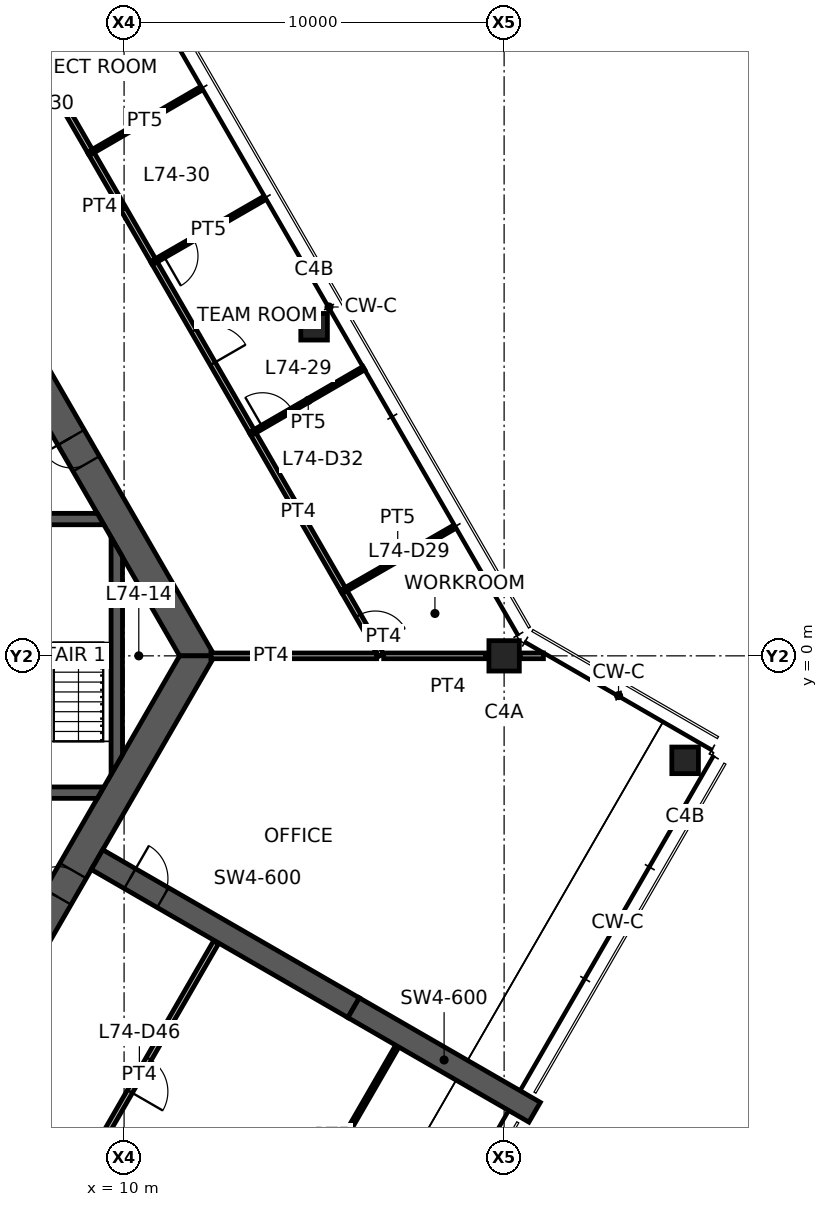
"""IFC4 building model, lengths in metres.
Left out: names, types, materials, properties, quantities, classifications, styles, units other than length and angle.
Written with IfcOpenShell. Run it as: python <this file> out.ifc"""

import sys

from ifc_helpers import new_model, si_unit, direction, frame, frame_2d, origin, origin_2d, place, context, subcontext, project, spatial, polyline, rectangle, hollow_rectangle, outline, extrude, element, fill, save


model = new_model("IFC4")
c1 = context("Model", 3, precision=1e-05, world=origin(), true_north=direction((0.0, 1.0)))
c2 = subcontext(c1, "Body", "Model", "MODEL_VIEW")
j1 = project(units=[si_unit("LENGTHUNIT", "METRE"), si_unit("PLANEANGLEUNIT", "RADIAN")], contexts=[c1])
p1 = place(None, origin())
s1 = spatial("IfcSite", under=j1, at=p1, CompositionType="ELEMENT")
p2 = place(p1, origin())
s2 = spatial("IfcBuilding", under=s1, at=p2, CompositionType="ELEMENT")
p3 = place(p2, frame((0.0, 0.0, 294.7)))
s3 = spatial("IfcBuildingStorey", under=s2, at=p3, CompositionType="ELEMENT", Elevation=294.7)
p4 = place(p3, frame((20.0, 0.0, 0.0), z_axis=(0.0, 0.0, 1.0), x_axis=(1.0, 0.0, 0.0)))
e1 = element("IfcColumn", 1, at=p4, inside=s3, PredefinedType="COLUMN", context=c2, shape_type="SweptSolid", body=[
    extrude(hollow_rectangle(XDim=0.8, YDim=0.8, WallThickness=0.04, at=origin_2d()), origin(), (0.0, 0.0, 1.0), 3.9),
])
for number, where, z_axis, x_axis in (
    (2, (15.0, 8.66, 0.0), (0.0, 0.0, 1.0), (1.0, 0.0, 0.0)),
    (3, (24.763, -2.75, 0.0), (0.0, 0.0, 1.0), (1.0, 0.0, 0.0)),
):
    element("IfcColumn", number, at=place(p3, frame(where, z_axis=z_axis, x_axis=x_axis)), inside=s3, PredefinedType="COLUMN", context=c2, shape_type="SweptSolid", body=[
        extrude(hollow_rectangle(XDim=0.7, YDim=0.7, WallThickness=0.032, at=origin_2d()), origin(), (0.0, 0.0, 1.0), 3.9),
    ])
p5 = place(p3, frame((11.922, 0.0, 0.0), z_axis=(0.0, 0.0, 1.0), x_axis=(-0.500004296715, 0.866022923061, 0.0)))
e4 = element("IfcWall", 4, at=p5, inside=s3, PredefinedType="SHEAR", context=c2, shape_type="SweptSolid", body=[
    extrude(outline(polyline([(-0.231, -0.4), (5.835, -0.4), (6.635, -0.4), (12.153, -0.4), (11.691, 0.4), (6.635, 0.4), (5.835, 0.4), (0.231, 0.4), (-0.231, -0.4)])), origin(), (0.0, 0.0, 1.0), 3.9),
])
p6 = place(p5, frame((5.835, 0.0, 0.0)))
e5 = element("IfcOpeningElement", 5, at=p6, cuts=e4, PredefinedType="OPENING", context=c2, shape_type="SweptSolid", body=[
    extrude(rectangle(XDim=0.8, YDim=2.1, at=frame_2d((0.4, 1.05))), frame((0.0, 0.41, 0.0), z_axis=(0.0, -1.0, 0.0), x_axis=(1.0, 0.0, 0.0)), (0.0, 0.0, 1.0), 0.82),
])
p7 = place(p3, frame((5.961, -10.325, 0.0), z_axis=(0.0, 0.0, 1.0), x_axis=(0.500004296715, 0.866022923061, 0.0)))
e6 = element("IfcWall", 6, at=p7, inside=s3, PredefinedType="SHEAR", context=c2, shape_type="SweptSolid", body=[
    extrude(outline(polyline([(-0.231, -0.4), (4.594, -0.4), (5.394, -0.4), (12.153, -0.4), (11.691, 0.4), (5.394, 0.4), (4.594, 0.4), (0.231, 0.4), (-0.231, -0.4)])), origin(), (0.0, 0.0, 1.0), 3.9),
])
p8 = place(p7, frame((4.594, 0.0, 0.0)))
e7 = element("IfcOpeningElement", 7, at=p8, cuts=e6, PredefinedType="OPENING", context=c2, shape_type="SweptSolid", body=[
    extrude(rectangle(XDim=0.8, YDim=2.1, at=frame_2d((0.4, 1.05))), frame((0.0, 0.41, 0.0), z_axis=(0.0, -1.0, 0.0), x_axis=(1.0, 0.0, 0.0)), (0.0, 0.0, 1.0), 0.82),
])
p9 = place(p3, frame((9.288, -5.363, 0.0), z_axis=(0.0, 0.0, 1.0), x_axis=(0.866031736626, -0.499989031036, 0.0)))
e8 = element("IfcWall", 8, at=p9, inside=s3, PredefinedType="SHEAR", context=c2, shape_type="SweptSolid", body=[
    extrude(rectangle(XDim=7.796, YDim=0.6, at=frame_2d((3.898, 0.0))), origin(), (0.0, 0.0, 1.0), 3.9),
])
p10 = place(p9, frame((1.0, 0.0, 0.0)))
e9 = element("IfcOpeningElement", 9, at=p10, cuts=e8, PredefinedType="OPENING", context=c2, shape_type="SweptSolid", body=[
    extrude(rectangle(XDim=1.0, YDim=2.1, at=frame_2d((0.5, 1.05))), frame((0.0, 0.31, 0.0), z_axis=(0.0, -1.0, 0.0), x_axis=(1.0, 0.0, 0.0)), (0.0, 0.0, 1.0), 0.62),
])
p11 = place(p3, frame((16.039, -9.26, 0.0), z_axis=(0.0, 0.0, 1.0), x_axis=(0.866027397988, -0.499996545922, 0.0)))
e10 = element("IfcWall", 10, at=p11, inside=s3, PredefinedType="SHEAR", context=c2, shape_type="SweptSolid", body=[
    extrude(rectangle(XDim=5.5, YDim=0.6, at=frame_2d((2.75, 0.0))), origin(), (0.0, 0.0, 1.0), 3.9),
])
p12 = place(p3, frame((1.45, 3.6, 0.0), z_axis=(0.0, 0.0, 1.0), x_axis=(1.0, 0.0, 0.0)))
e11 = element("IfcWall", 11, at=p12, inside=s3, PredefinedType="SHEAR", context=c2, shape_type="SweptSolid", body=[
    extrude(outline(polyline([(0.0, -0.15), (1.15, -0.15), (2.05, -0.15), (3.4, -0.15), (4.7, -0.15), (8.019, -0.15), (7.845, 0.15), (4.7, 0.15), (3.4, 0.15), (2.05, 0.15), (1.15, 0.15), (0.0, 0.15), (0.0, -0.15)])), origin(), (0.0, 0.0, 1.0), 3.9),
])
p13 = place(p12, frame((1.15, 0.0, 0.0)))
e12 = element("IfcOpeningElement", 12, at=p13, cuts=e11, PredefinedType="OPENING", context=c2, shape_type="SweptSolid", body=[
    extrude(rectangle(XDim=0.9, YDim=2.1, at=frame_2d((0.45, 1.05))), frame((0.0, 0.16, 0.0), z_axis=(0.0, -1.0, 0.0), x_axis=(1.0, 0.0, 0.0)), (0.0, 0.0, 1.0), 0.32),
])
p14 = place(p12, frame((3.4, 0.0, 0.0)))
e13 = element("IfcOpeningElement", 13, at=p14, cuts=e11, PredefinedType="OPENING", context=c2, shape_type="SweptSolid", body=[
    extrude(rectangle(XDim=1.3, YDim=2.1, at=frame_2d((0.65, 1.05))), frame((0.0, 0.16, 0.0), z_axis=(0.0, -1.0, 0.0), x_axis=(1.0, 0.0, 0.0)), (0.0, 0.0, 1.0), 0.32),
])
p15 = place(p3, frame((1.45, -3.6, 0.0), z_axis=(0.0, 0.0, 1.0), x_axis=(1.0, 0.0, 0.0)))
e14 = element("IfcWall", 14, at=p15, inside=s3, PredefinedType="SHEAR", context=c2, shape_type="SweptSolid", body=[
    extrude(outline(polyline([(0.0, -0.15), (1.05, -0.15), (2.15, -0.15), (7.845, -0.15), (8.019, 0.15), (2.15, 0.15), (1.05, 0.15), (0.0, 0.15), (0.0, -0.15)])), origin(), (0.0, 0.0, 1.0), 3.9),
])
p16 = place(p15, frame((1.05, 0.0, 0.0)))
e15 = element("IfcOpeningElement", 15, at=p16, cuts=e14, PredefinedType="OPENING", context=c2, shape_type="SweptSolid", body=[
    extrude(rectangle(XDim=1.1, YDim=2.1, at=frame_2d((0.55, 1.05))), frame((0.0, 0.16, 0.0), z_axis=(0.0, -1.0, 0.0), x_axis=(1.0, 0.0, 0.0)), (0.0, 0.0, 1.0), 0.32),
])
p17 = place(p3, frame((9.808, -2.862, 0.0), z_axis=(0.0, 0.0, 1.0), x_axis=(0.0, 1.0, 0.0)))
e16 = element("IfcWall", 16, at=p17, inside=s3, PredefinedType="SHEAR", context=c2, shape_type="SweptSolid", body=[
    extrude(outline(polyline([(0.26, -0.15), (5.465, -0.15), (5.984, 0.15), (-0.26, 0.15), (0.26, -0.15)])), origin(), (0.0, 0.0, 1.0), 3.9),
])
p18 = place(p3, frame((13.376, 5.882, 0.0), z_axis=(0.0, 0.0, 1.0), x_axis=(0.499991431567, -0.866030350715, 0.0)))
e17 = element("IfcWall", 17, at=p18, inside=s3, PredefinedType="PARTITIONING", context=c2, shape_type="SweptSolid", body=[
    extrude(rectangle(XDim=4.819, YDim=0.15, at=frame_2d((2.409, 0.0))), origin(), (0.0, 0.0, 1.0), 2.95),
])
p19 = place(p3, frame((9.119, 13.256, 0.0), z_axis=(0.0, 0.0, 1.0), x_axis=(0.499990242038, -0.866031037473, 0.0)))
e18 = element("IfcWall", 18, at=p19, inside=s3, PredefinedType="PARTITIONING", context=c2, shape_type="SweptSolid", body=[
    extrude(rectangle(XDim=3.341, YDim=0.15, at=frame_2d((1.67, 0.0))), origin(), (0.0, 0.0, 1.0), 2.95),
])
p20 = place(p3, frame((15.781, 1.717, 0.0), z_axis=(0.0, 0.0, 1.0), x_axis=(0.499984888139, -0.866034128446, 0.0)))
e19 = element("IfcWall", 19, at=p20, inside=s3, PredefinedType="PARTITIONING", context=c2, shape_type="SweptSolid", body=[
    extrude(rectangle(XDim=1.959, YDim=0.15, at=frame_2d((0.98, 0.0))), origin(), (0.0, 0.0, 1.0), 2.95),
])
p21 = place(p20, frame((0.76, 0.0, 0.0)))
e20 = element("IfcOpeningElement", 20, at=p21, cuts=e19, PredefinedType="OPENING", context=c2, shape_type="SweptSolid", body=[
    extrude(rectangle(XDim=0.9, YDim=2.1, at=frame_2d((0.45, 1.05))), frame((0.0, 0.085, 0.0), z_axis=(0.0, -1.0, 0.0), x_axis=(1.0, 0.0, 0.0)), (0.0, 0.0, 1.0), 0.17),
])
p22 = place(p3, frame((6.826, 14.525, 0.0), z_axis=(0.0, 0.0, 1.0), x_axis=(1.0, 0.0, 0.0)))
e21 = element("IfcWall", 21, at=p22, inside=s3, PredefinedType="PARTITIONING", context=c2, shape_type="SweptSolid", body=[
    extrude(rectangle(XDim=1.56, YDim=0.15, at=frame_2d((0.78, 0.0))), origin(), (0.0, 0.0, 1.0), 2.95),
])
p23 = place(p22, frame((0.33, 0.0, 0.0)))
e22 = element("IfcOpeningElement", 22, at=p23, cuts=e21, PredefinedType="OPENING", context=c2, shape_type="SweptSolid", body=[
    extrude(rectangle(XDim=0.9, YDim=2.1, at=frame_2d((0.45, 1.05))), frame((0.0, 0.085, 0.0), z_axis=(0.0, -1.0, 0.0), x_axis=(1.0, 0.0, 0.0)), (0.0, 0.0, 1.0), 0.17),
])
p24 = place(p3, frame((8.386, 14.525, 0.0), z_axis=(0.0, 0.0, 1.0), x_axis=(0.500090108003, -0.865973373654, 0.0)))
e23 = element("IfcWall", 23, at=p24, inside=s3, PredefinedType="PARTITIONING", context=c2, shape_type="SweptSolid", body=[
    extrude(rectangle(XDim=1.475, YDim=0.15, at=frame_2d((0.738, 0.0))), origin(), (0.0, 0.0, 1.0), 2.95),
])
p25 = place(p3, frame((10.785, 10.37, 0.0), z_axis=(0.0, 0.0, 1.0), x_axis=(0.499992432099, -0.86602977307, 0.0)))
e24 = element("IfcWall", 24, at=p25, inside=s3, PredefinedType="PARTITIONING", context=c2, shape_type="SweptSolid", body=[
    extrude(rectangle(XDim=5.192, YDim=0.15, at=frame_2d((2.596, 0.0))), origin(), (0.0, 0.0, 1.0), 2.95),
])
p26 = place(p25, frame((2.096, 0.0, 0.0)))
e25 = element("IfcOpeningElement", 25, at=p26, cuts=e24, PredefinedType="OPENING", context=c2, shape_type="SweptSolid", body=[
    extrude(rectangle(XDim=1.0, YDim=2.1, at=frame_2d((0.5, 1.05))), frame((0.0, 0.085, 0.0), z_axis=(0.0, -1.0, 0.0), x_axis=(1.0, 0.0, 0.0)), (0.0, 0.0, 1.0), 0.17),
])
p27 = place(p3, frame((18.62, 3.351, 0.0), z_axis=(0.0, 0.0, 1.0), x_axis=(-0.866762109236, -0.498721812229, 0.0)))
e26 = element("IfcWall", 26, at=p27, inside=s3, PredefinedType="PARTITIONING", context=c2, shape_type="SweptSolid", body=[
    extrude(rectangle(XDim=3.275, YDim=0.1, at=frame_2d((1.637, 0.0))), origin(), (0.0, 0.0, 1.0), 2.95),
])
p28 = place(p3, frame((13.381, 5.874, 0.0), z_axis=(0.0, 0.0, 1.0), x_axis=(0.865294595383, 0.501263666348, 0.0)))
e27 = element("IfcWall", 27, at=p28, inside=s3, PredefinedType="PARTITIONING", context=c2, shape_type="SweptSolid", body=[
    extrude(rectangle(XDim=3.385, YDim=0.1, at=frame_2d((1.693, 0.0))), origin(), (0.0, 0.0, 1.0), 2.95),
])
p29 = place(p28, frame((0.3, 0.0, 0.0)))
e28 = element("IfcOpeningElement", 28, at=p29, cuts=e27, PredefinedType="OPENING", context=c2, shape_type="SweptSolid", body=[
    extrude(rectangle(XDim=0.9, YDim=2.1, at=frame_2d((0.45, 1.05))), frame((0.0, 0.06, 0.0), z_axis=(0.0, -1.0, 0.0), x_axis=(1.0, 0.0, 0.0)), (0.0, 0.0, 1.0), 0.12),
])
p30 = place(p3, frame((9.124, 13.247, 0.0), z_axis=(0.0, 0.0, 1.0), x_axis=(0.865292288087, 0.501267649243, 0.0)))
e29 = element("IfcWall", 29, at=p30, inside=s3, PredefinedType="PARTITIONING", context=c2, shape_type="SweptSolid", body=[
    extrude(rectangle(XDim=3.286, YDim=0.1, at=frame_2d((1.643, 0.0))), origin(), (0.0, 0.0, 1.0), 2.95),
])
p31 = place(p3, frame((13.654, 12.022, 0.0), z_axis=(0.0, 0.0, 1.0), x_axis=(-0.866613759554, -0.498979550434, 0.0)))
e30 = element("IfcWall", 30, at=p31, inside=s3, PredefinedType="PARTITIONING", context=c2, shape_type="SweptSolid", body=[
    extrude(rectangle(XDim=3.311, YDim=0.1, at=frame_2d((1.655, 0.0))), origin(), (0.0, 0.0, 1.0), 2.95),
])
p32 = place(p31, frame((2.11, 0.0, 0.0)))
e31 = element("IfcOpeningElement", 31, at=p32, cuts=e30, PredefinedType="OPENING", context=c2, shape_type="SweptSolid", body=[
    extrude(rectangle(XDim=0.9, YDim=2.1, at=frame_2d((0.45, 1.05))), frame((0.0, 0.06, 0.0), z_axis=(0.0, -1.0, 0.0), x_axis=(1.0, 0.0, 0.0)), (0.0, 0.0, 1.0), 0.12),
])
p33 = place(p3, frame((12.419, -7.54, 0.0), z_axis=(0.0, 0.0, 1.0), x_axis=(-0.499996687877, -0.866027316031, 0.0)))
e32 = element("IfcWall", 32, at=p33, inside=s3, PredefinedType="PARTITIONING", context=c2, shape_type="SweptSolid", body=[
    extrude(rectangle(XDim=8.066, YDim=0.15, at=frame_2d((4.033, 0.0))), origin(), (0.0, 0.0, 1.0), 2.95),
])
p34 = place(p33, frame((3.533, 0.0, 0.0)))
e33 = element("IfcOpeningElement", 33, at=p34, cuts=e32, PredefinedType="OPENING", context=c2, shape_type="SweptSolid", body=[
    extrude(rectangle(XDim=1.0, YDim=2.1, at=frame_2d((0.5, 1.05))), frame((0.0, 0.085, 0.0), z_axis=(0.0, -1.0, 0.0), x_axis=(1.0, 0.0, 0.0)), (0.0, 0.0, 1.0), 0.17),
])
p35 = place(p3, frame((13.788, -16.159, 0.0), z_axis=(0.0, 0.0, 1.0), x_axis=(0.499992600721, 0.866029675718, 0.0)))
e34 = element("IfcWall", 34, at=p35, inside=s3, PredefinedType="PARTITIONING", context=c2, shape_type="SweptSolid", body=[
    extrude(rectangle(XDim=6.78, YDim=0.1, at=frame_2d((3.39, 0.0))), origin(), (0.0, 0.0, 1.0), 2.95),
])
p36 = place(p35, frame((0.3, 0.0, 0.0)))
e35 = element("IfcOpeningElement", 35, at=p36, cuts=e34, PredefinedType="OPENING", context=c2, shape_type="SweptSolid", body=[
    extrude(rectangle(XDim=0.9, YDim=2.1, at=frame_2d((0.45, 1.05))), frame((0.0, 0.06, 0.0), z_axis=(0.0, -1.0, 0.0), x_axis=(1.0, 0.0, 0.0)), (0.0, 0.0, 1.0), 0.12),
])
p37 = place(p3, frame((19.519, 0.0, 0.0), z_axis=(0.0, 0.0, 1.0), x_axis=(-1.0, 0.0, 0.0)))
e36 = element("IfcWall", 36, at=p37, inside=s3, PredefinedType="PARTITIONING", context=c2, shape_type="SweptSolid", body=[
    extrude(rectangle(XDim=2.688, YDim=0.15, at=frame_2d((1.344, 0.0))), origin(), (0.0, 0.0, 1.0), 2.95),
])
p38 = place(p3, frame((12.284, 0.0, 0.0), z_axis=(0.0, 0.0, 1.0), x_axis=(1.0, 0.0, 0.0)))
e37 = element("IfcWall", 37, at=p38, inside=s3, PredefinedType="PARTITIONING", context=c2, shape_type="SweptSolid", body=[
    extrude(rectangle(XDim=4.363, YDim=0.15, at=frame_2d((2.181, 0.0))), origin(), (0.0, 0.0, 1.0), 2.95),
])
p39 = place(p3, frame((20.42, 0.0, 0.0), z_axis=(0.0, 0.0, 1.0), x_axis=(1.0, 0.0, 0.0)))
e38 = element("IfcWall", 38, at=p39, inside=s3, PredefinedType="PARTITIONING", context=c2, shape_type="SweptSolid", body=[
    extrude(rectangle(XDim=0.614, YDim=0.15, at=frame_2d((0.307, 0.0))), origin(), (0.0, 0.0, 1.0), 2.95),
])
p40 = place(p6, origin())
e39 = element("IfcDoor", 39, at=p40, inside=s3, OperationType="SINGLE_SWING_RIGHT", PredefinedType="DOOR", context=c2, shape_type="SweptSolid", body=[
    extrude(rectangle(XDim=0.8, YDim=2.1, at=frame_2d((0.4, 1.05))), frame((0.0, 0.025, 0.0), z_axis=(0.0, -1.0, 0.0), x_axis=(1.0, 0.0, 0.0)), (0.0, 0.0, 1.0), 0.05),
])
fill(e5, e39)
p41 = place(p8, origin())
e40 = element("IfcDoor", 40, at=p41, inside=s3, OperationType="SINGLE_SWING_LEFT", PredefinedType="DOOR", context=c2, shape_type="SweptSolid", body=[
    extrude(rectangle(XDim=0.8, YDim=2.1, at=frame_2d((0.4, 1.05))), frame((0.0, 0.025, 0.0), z_axis=(0.0, -1.0, 0.0), x_axis=(1.0, 0.0, 0.0)), (0.0, 0.0, 1.0), 0.05),
])
fill(e7, e40)
p42 = place(p10, origin())
e41 = element("IfcDoor", 41, at=p42, inside=s3, OperationType="SINGLE_SWING_LEFT", PredefinedType="DOOR", context=c2, shape_type="SweptSolid", body=[
    extrude(rectangle(XDim=1.0, YDim=2.1, at=frame_2d((0.5, 1.05))), frame((0.0, 0.025, 0.0), z_axis=(0.0, -1.0, 0.0), x_axis=(1.0, 0.0, 0.0)), (0.0, 0.0, 1.0), 0.05),
])
fill(e9, e41)
p43 = place(p21, origin())
e42 = element("IfcDoor", 42, at=p43, inside=s3, OperationType="SINGLE_SWING_RIGHT", PredefinedType="DOOR", context=c2, shape_type="SweptSolid", body=[
    extrude(rectangle(XDim=0.9, YDim=2.1, at=frame_2d((0.45, 1.05))), frame((0.0, 0.025, 0.0), z_axis=(0.0, -1.0, 0.0), x_axis=(1.0, 0.0, 0.0)), (0.0, 0.0, 1.0), 0.05),
])
fill(e20, e42)
p44 = place(p26, origin())
e43 = element("IfcDoor", 43, at=p44, inside=s3, OperationType="SINGLE_SWING_RIGHT", PredefinedType="DOOR", context=c2, shape_type="SweptSolid", body=[
    extrude(rectangle(XDim=1.0, YDim=2.1, at=frame_2d((0.5, 1.05))), frame((0.0, 0.025, 0.0), z_axis=(0.0, -1.0, 0.0), x_axis=(1.0, 0.0, 0.0)), (0.0, 0.0, 1.0), 0.05),
])
fill(e25, e43)
p45 = place(p29, origin())
e44 = element("IfcDoor", 44, at=p45, inside=s3, OperationType="SINGLE_SWING_LEFT", PredefinedType="DOOR", context=c2, shape_type="SweptSolid", body=[
    extrude(rectangle(XDim=0.9, YDim=2.1, at=frame_2d((0.45, 1.05))), frame((0.0, 0.025, 0.0), z_axis=(0.0, -1.0, 0.0), x_axis=(1.0, 0.0, 0.0)), (0.0, 0.0, 1.0), 0.05),
])
fill(e28, e44)
p46 = place(p32, origin())
e45 = element("IfcDoor", 45, at=p46, inside=s3, OperationType="SINGLE_SWING_RIGHT", PredefinedType="DOOR", context=c2, shape_type="SweptSolid", body=[
    extrude(rectangle(XDim=0.9, YDim=2.1, at=frame_2d((0.45, 1.05))), frame((0.0, 0.025, 0.0), z_axis=(0.0, -1.0, 0.0), x_axis=(1.0, 0.0, 0.0)), (0.0, 0.0, 1.0), 0.05),
])
fill(e31, e45)
p47 = place(p34, origin())
e46 = element("IfcDoor", 46, at=p47, inside=s3, OperationType="SINGLE_SWING_RIGHT", PredefinedType="DOOR", context=c2, shape_type="SweptSolid", body=[
    extrude(rectangle(XDim=1.0, YDim=2.1, at=frame_2d((0.5, 1.05))), frame((0.0, 0.025, 0.0), z_axis=(0.0, -1.0, 0.0), x_axis=(1.0, 0.0, 0.0)), (0.0, 0.0, 1.0), 0.05),
])
fill(e33, e46)
save(model, sys.argv[1])
